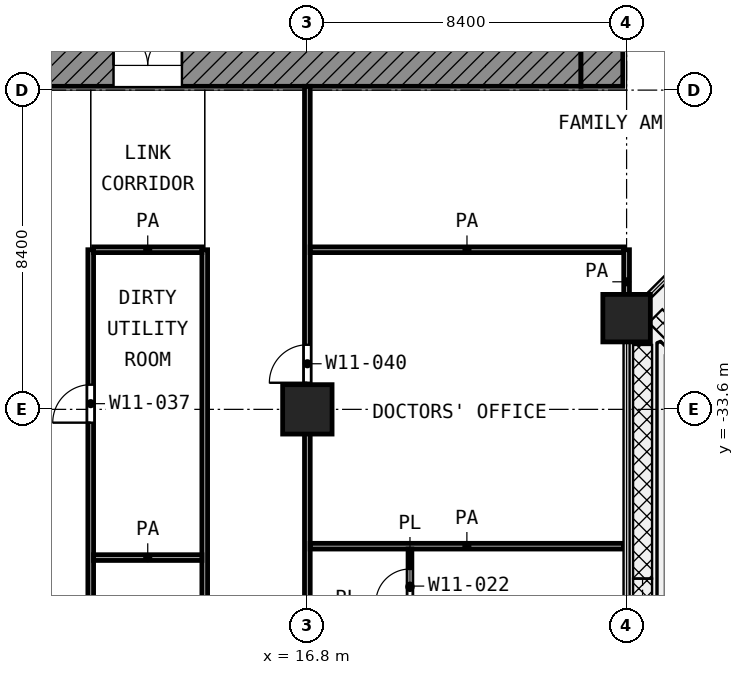
"""IFC4 building model, lengths in metres.
Left out: names, types, materials, properties, quantities, classifications, styles, units other than length and angle.
Written with IfcOpenShell. Run it as: python <this file> out.ifc"""

import sys

from ifc_helpers import new_model, si_unit, direction, frame, frame_2d, origin, origin_2d, place, context, subcontext, project, spatial, rectangle, extrude, element, fill, save


model = new_model("IFC4")
c1 = context("Model", 3, precision=1e-05, world=origin(), true_north=direction((0.0, 1.0)))
c2 = subcontext(c1, "Body", "Model", "MODEL_VIEW")
j1 = project(units=[si_unit("LENGTHUNIT", "METRE"), si_unit("PLANEANGLEUNIT", "RADIAN")], contexts=[c1])
p1 = place(None, origin())
s1 = spatial("IfcSite", under=j1, at=p1, CompositionType="ELEMENT")
p2 = place(p1, origin())
s2 = spatial("IfcBuilding", under=s1, at=p2, CompositionType="ELEMENT")
p3 = place(p2, frame((0.0, 0.0, 72.8)))
s3 = spatial("IfcBuildingStorey", under=s2, at=p3, CompositionType="ELEMENT", Elevation=72.8)
p4 = place(p3, frame((25.2, -31.2, 0.0), z_axis=(0.0, 0.0, 1.0), x_axis=(1.0, 0.0, 0.0)))
e1 = element("IfcColumn", 1, at=p4, inside=s3, PredefinedType="COLUMN", context=c2, shape_type="SweptSolid", body=[
    extrude(rectangle(XDim=1.25, YDim=1.25, at=origin_2d()), origin(), (0.0, 0.0, 1.0), 4.2),
])
p5 = place(p3, frame((16.8, -33.6, 0.0), z_axis=(0.0, 0.0, 1.0), x_axis=(1.0, 0.0, 0.0)))
e2 = element("IfcColumn", 2, at=p5, inside=s3, PredefinedType="COLUMN", context=c2, shape_type="SweptSolid", body=[
    extrude(rectangle(XDim=1.3, YDim=1.3, at=origin_2d()), origin(), (0.0, 0.0, 1.0), 4.2),
])
p6 = place(p3, frame((5.4, -24.55, 0.0), z_axis=(0.0, 0.0, 1.0), x_axis=(1.0, 0.0, 0.0)))
e3 = element("IfcWall", 3, at=p6, inside=s3, PredefinedType="SHEAR", context=c2, shape_type="SweptSolid", body=[
    extrude(rectangle(XDim=18.6, YDim=1.1, at=frame_2d((9.3, 0.0))), origin(), (0.0, 0.0, 1.0), 3.9),
])
p7 = place(p6, frame((6.3, 0.0, 0.0)))
e4 = element("IfcOpeningElement", 4, at=p7, cuts=e3, PredefinedType="OPENING", context=c2, shape_type="SweptSolid", body=[
    extrude(rectangle(XDim=1.8, YDim=2.1, at=frame_2d((0.9, 1.05))), frame((0.0, 0.56, 0.0), z_axis=(0.0, -1.0, 0.0), x_axis=(1.0, 0.0, 0.0)), (0.0, 0.0, 1.0), 1.12),
])
p8 = place(p3, frame((24.55, -25.1, 0.0), z_axis=(0.0, 0.0, 1.0), x_axis=(0.0, 1.0, 0.0)))
e5 = element("IfcWall", 5, at=p8, inside=s3, PredefinedType="SHEAR", context=c2, shape_type="SweptSolid", body=[
    extrude(rectangle(XDim=1.1, YDim=1.1, at=frame_2d((0.55, 0.0))), origin(), (0.0, 0.0, 1.0), 3.9),
])
p9 = place(p3, frame((19.5, -39.3, 0.0), z_axis=(0.0, 0.0, 1.0), x_axis=(0.0, 1.0, 0.0)))
e6 = element("IfcWall", 6, at=p9, inside=s3, PredefinedType="PARTITIONING", context=c2, shape_type="SweptSolid", body=[
    extrude(rectangle(XDim=2.025, YDim=0.1, at=frame_2d((1.013, 0.0))), origin(), (0.0, 0.0, 1.0), 3.9),
])
p10 = place(p9, frame((0.6, 0.0, 0.0)))
e7 = element("IfcOpeningElement", 7, at=p10, cuts=e6, PredefinedType="OPENING", context=c2, shape_type="SweptSolid", body=[
    extrude(rectangle(XDim=0.9, YDim=2.1, at=frame_2d((0.45, 1.05))), frame((0.0, 0.06, 0.0), z_axis=(0.0, -1.0, 0.0), x_axis=(1.0, 0.0, 0.0)), (0.0, 0.0, 1.0), 0.12),
])
p11 = place(p3, frame((11.175, -37.5, 0.0), z_axis=(0.0, 0.0, 1.0), x_axis=(1.0, 0.0, 0.0)))
e8 = element("IfcWall", 8, at=p11, inside=s3, PredefinedType="PARTITIONING", context=c2, shape_type="SweptSolid", body=[
    extrude(rectangle(XDim=2.85, YDim=0.15, at=frame_2d((1.425, 0.0))), origin(), (0.0, 0.0, 1.0), 3.9),
])
p12 = place(p3, frame((16.875, -37.2, 0.0), z_axis=(0.0, 0.0, 1.0), x_axis=(1.0, 0.0, 0.0)))
e9 = element("IfcWall", 9, at=p12, inside=s3, PredefinedType="PARTITIONING", context=c2, shape_type="SweptSolid", body=[
    extrude(rectangle(XDim=8.245, YDim=0.15, at=frame_2d((4.123, 0.0))), origin(), (0.0, 0.0, 1.0), 3.9),
])
p13 = place(p3, frame((11.175, -29.4, 0.0), z_axis=(0.0, 0.0, 1.0), x_axis=(1.0, 0.0, 0.0)))
e10 = element("IfcWall", 10, at=p13, inside=s3, PredefinedType="PARTITIONING", context=c2, shape_type="SweptSolid", body=[
    extrude(rectangle(XDim=2.85, YDim=0.15, at=frame_2d((1.425, 0.0))), origin(), (0.0, 0.0, 1.0), 3.9),
])
p14 = place(p3, frame((16.875, -29.4, 0.0), z_axis=(0.0, 0.0, 1.0), x_axis=(1.0, 0.0, 0.0)))
e11 = element("IfcWall", 11, at=p14, inside=s3, PredefinedType="PARTITIONING", context=c2, shape_type="SweptSolid", body=[
    extrude(rectangle(XDim=8.25, YDim=0.15, at=frame_2d((4.125, 0.0))), origin(), (0.0, 0.0, 1.0), 3.9),
])
p15 = place(p3, frame((11.1, -68.7, 0.0), z_axis=(0.0, 0.0, 1.0), x_axis=(0.0, 1.0, 0.0)))
e12 = element("IfcWall", 12, at=p15, inside=s3, PredefinedType="PARTITIONING", context=c2, shape_type="SweptSolid", body=[
    extrude(rectangle(XDim=39.3, YDim=0.15, at=frame_2d((19.65, 0.0))), origin(), (0.0, 0.0, 1.0), 3.9),
])
p16 = place(p15, frame((34.75, 0.0, 0.0)))
e13 = element("IfcOpeningElement", 13, at=p16, cuts=e12, PredefinedType="OPENING", context=c2, shape_type="SweptSolid", body=[
    extrude(rectangle(XDim=1.0, YDim=2.1, at=frame_2d((0.5, 1.05))), frame((0.0, 0.085, 0.0), z_axis=(0.0, -1.0, 0.0), x_axis=(1.0, 0.0, 0.0)), (0.0, 0.0, 1.0), 0.17),
])
p17 = place(p15, frame((24.25, 0.0, 0.0)))
e14 = element("IfcOpeningElement", 14, at=p17, cuts=e12, PredefinedType="OPENING", context=c2, shape_type="SweptSolid", body=[
    extrude(rectangle(XDim=1.0, YDim=2.1, at=frame_2d((0.5, 1.05))), frame((0.0, 0.085, 0.0), z_axis=(0.0, -1.0, 0.0), x_axis=(1.0, 0.0, 0.0)), (0.0, 0.0, 1.0), 0.17),
])
p18 = place(p15, frame((16.0, 0.0, 0.0)))
e15 = element("IfcOpeningElement", 15, at=p18, cuts=e12, PredefinedType="OPENING", context=c2, shape_type="SweptSolid", body=[
    extrude(rectangle(XDim=1.0, YDim=2.1, at=frame_2d((0.5, 1.05))), frame((0.0, 0.085, 0.0), z_axis=(0.0, -1.0, 0.0), x_axis=(1.0, 0.0, 0.0)), (0.0, 0.0, 1.0), 0.17),
])
p19 = place(p15, frame((11.85, 0.0, 0.0)))
e16 = element("IfcOpeningElement", 16, at=p19, cuts=e12, PredefinedType="OPENING", context=c2, shape_type="SweptSolid", body=[
    extrude(rectangle(XDim=0.9, YDim=2.1, at=frame_2d((0.45, 1.05))), frame((0.0, 0.085, 0.0), z_axis=(0.0, -1.0, 0.0), x_axis=(1.0, 0.0, 0.0)), (0.0, 0.0, 1.0), 0.17),
])
p20 = place(p3, frame((14.1, -68.7, 0.0), z_axis=(0.0, 0.0, 1.0), x_axis=(0.0, 1.0, 0.0)))
e17 = element("IfcWall", 17, at=p20, inside=s3, PredefinedType="PARTITIONING", context=c2, shape_type="SweptSolid", body=[
    extrude(rectangle(XDim=39.3, YDim=0.15, at=frame_2d((19.65, 0.0))), origin(), (0.0, 0.0, 1.0), 3.9),
])
p21 = place(p20, frame((4.35, 0.0, 0.0)))
e18 = element("IfcOpeningElement", 18, at=p21, cuts=e17, PredefinedType="OPENING", context=c2, shape_type="SweptSolid", body=[
    extrude(rectangle(XDim=1.2, YDim=2.1, at=frame_2d((0.6, 1.05))), frame((0.0, 0.085, 0.0), z_axis=(0.0, -1.0, 0.0), x_axis=(1.0, 0.0, 0.0)), (0.0, 0.0, 1.0), 0.17),
])
p22 = place(p3, frame((16.8, -71.32, 0.0), z_axis=(0.0, 0.0, 1.0), x_axis=(0.0, 1.0, 0.0)))
e19 = element("IfcWall", 19, at=p22, inside=s3, PredefinedType="PARTITIONING", context=c2, shape_type="SweptSolid", body=[
    extrude(rectangle(XDim=46.22, YDim=0.15, at=frame_2d((23.11, 0.0))), origin(), (0.0, 0.0, 1.0), 3.9),
])
p23 = place(p22, frame((38.42, 0.0, 0.0)))
e20 = element("IfcOpeningElement", 20, at=p23, cuts=e19, PredefinedType="OPENING", context=c2, shape_type="SweptSolid", body=[
    extrude(rectangle(XDim=1.0, YDim=2.1, at=frame_2d((0.5, 1.05))), frame((0.0, 0.085, 0.0), z_axis=(0.0, -1.0, 0.0), x_axis=(1.0, 0.0, 0.0)), (0.0, 0.0, 1.0), 0.17),
])
p24 = place(p22, frame((30.22, 0.0, 0.0)))
e21 = element("IfcOpeningElement", 21, at=p24, cuts=e19, PredefinedType="OPENING", context=c2, shape_type="SweptSolid", body=[
    extrude(rectangle(XDim=1.2, YDim=2.1, at=frame_2d((0.6, 1.05))), frame((0.0, 0.085, 0.0), z_axis=(0.0, -1.0, 0.0), x_axis=(1.0, 0.0, 0.0)), (0.0, 0.0, 1.0), 0.17),
])
p25 = place(p22, frame((27.42, 0.0, 0.0)))
e22 = element("IfcOpeningElement", 22, at=p25, cuts=e19, PredefinedType="OPENING", context=c2, shape_type="SweptSolid", body=[
    extrude(rectangle(XDim=1.2, YDim=2.1, at=frame_2d((0.6, 1.05))), frame((0.0, 0.085, 0.0), z_axis=(0.0, -1.0, 0.0), x_axis=(1.0, 0.0, 0.0)), (0.0, 0.0, 1.0), 0.17),
])
p26 = place(p22, frame((25.57, 0.0, 0.0)))
e23 = element("IfcOpeningElement", 23, at=p26, cuts=e19, PredefinedType="OPENING", context=c2, shape_type="SweptSolid", body=[
    extrude(rectangle(XDim=1.2, YDim=2.1, at=frame_2d((0.6, 1.05))), frame((0.0, 0.085, 0.0), z_axis=(0.0, -1.0, 0.0), x_axis=(1.0, 0.0, 0.0)), (0.0, 0.0, 1.0), 0.17),
])
p27 = place(p22, frame((21.62, 0.0, 0.0)))
e24 = element("IfcOpeningElement", 24, at=p27, cuts=e19, PredefinedType="OPENING", context=c2, shape_type="SweptSolid", body=[
    extrude(rectangle(XDim=1.2, YDim=2.1, at=frame_2d((0.6, 1.05))), frame((0.0, 0.085, 0.0), z_axis=(0.0, -1.0, 0.0), x_axis=(1.0, 0.0, 0.0)), (0.0, 0.0, 1.0), 0.17),
])
p28 = place(p22, frame((14.32, 0.0, 0.0)))
e25 = element("IfcOpeningElement", 25, at=p28, cuts=e19, PredefinedType="OPENING", context=c2, shape_type="SweptSolid", body=[
    extrude(rectangle(XDim=1.2, YDim=2.1, at=frame_2d((0.6, 1.05))), frame((0.0, 0.085, 0.0), z_axis=(0.0, -1.0, 0.0), x_axis=(1.0, 0.0, 0.0)), (0.0, 0.0, 1.0), 0.17),
])
p29 = place(p22, frame((18.52, 0.0, 0.0)))
e26 = element("IfcOpeningElement", 26, at=p29, cuts=e19, PredefinedType="OPENING", context=c2, shape_type="SweptSolid", body=[
    extrude(rectangle(XDim=1.2, YDim=2.1, at=frame_2d((0.6, 1.05))), frame((0.0, 0.085, 0.0), z_axis=(0.0, -1.0, 0.0), x_axis=(1.0, 0.0, 0.0)), (0.0, 0.0, 1.0), 0.17),
])
p30 = place(p22, frame((10.92, 0.0, 0.0)))
e27 = element("IfcOpeningElement", 27, at=p30, cuts=e19, PredefinedType="OPENING", context=c2, shape_type="SweptSolid", body=[
    extrude(rectangle(XDim=0.9, YDim=2.1, at=frame_2d((0.45, 1.05))), frame((0.0, 0.085, 0.0), z_axis=(0.0, -1.0, 0.0), x_axis=(1.0, 0.0, 0.0)), (0.0, 0.0, 1.0), 0.17),
])
p31 = place(p22, frame((4.82, 0.0, 0.0)))
e28 = element("IfcOpeningElement", 28, at=p31, cuts=e19, PredefinedType="OPENING", context=c2, shape_type="SweptSolid", body=[
    extrude(rectangle(XDim=1.5, YDim=2.1, at=frame_2d((0.75, 1.05))), frame((0.0, 0.085, 0.0), z_axis=(0.0, -1.0, 0.0), x_axis=(1.0, 0.0, 0.0)), (0.0, 0.0, 1.0), 0.17),
])
p32 = place(p3, frame((25.2, -31.087, 0.0), z_axis=(0.0, 0.0, 1.0), x_axis=(0.0, 1.0, 0.0)))
e29 = element("IfcWall", 29, at=p32, inside=s3, PredefinedType="PARTITIONING", context=c2, shape_type="SweptSolid", body=[
    extrude(rectangle(XDim=1.687, YDim=0.15, at=frame_2d((0.844, 0.0))), origin(), (0.0, 0.0, 1.0), 3.9),
])
p33 = place(p7, origin())
e30 = element("IfcDoor", 30, at=p33, inside=s3, OperationType="DOUBLE_DOOR_SINGLE_SWING", PredefinedType="DOOR", context=c2, shape_type="SweptSolid", body=[
    extrude(rectangle(XDim=1.8, YDim=2.1, at=frame_2d((0.9, 1.05))), frame((0.0, 0.025, 0.0), z_axis=(0.0, -1.0, 0.0), x_axis=(1.0, 0.0, 0.0)), (0.0, 0.0, 1.0), 0.05),
])
fill(e4, e30)
p34 = place(p16, origin())
e31 = element("IfcDoor", 31, at=p34, inside=s3, OperationType="SINGLE_SWING_LEFT", PredefinedType="DOOR", context=c2, shape_type="SweptSolid", body=[
    extrude(rectangle(XDim=1.0, YDim=2.1, at=frame_2d((0.5, 1.05))), frame((0.0, 0.025, 0.0), z_axis=(0.0, -1.0, 0.0), x_axis=(1.0, 0.0, 0.0)), (0.0, 0.0, 1.0), 0.05),
])
fill(e13, e31)
p35 = place(p23, origin())
e32 = element("IfcDoor", 32, at=p35, inside=s3, OperationType="SINGLE_SWING_LEFT", PredefinedType="DOOR", context=c2, shape_type="SweptSolid", body=[
    extrude(rectangle(XDim=1.0, YDim=2.1, at=frame_2d((0.5, 1.05))), frame((0.0, 0.025, 0.0), z_axis=(0.0, -1.0, 0.0), x_axis=(1.0, 0.0, 0.0)), (0.0, 0.0, 1.0), 0.05),
])
fill(e20, e32)
p36 = place(p10, origin())
e33 = element("IfcDoor", 33, at=p36, inside=s3, OperationType="SINGLE_SWING_LEFT", PredefinedType="DOOR", context=c2, shape_type="SweptSolid", body=[
    extrude(rectangle(XDim=0.9, YDim=2.1, at=frame_2d((0.45, 1.05))), frame((0.0, 0.025, 0.0), z_axis=(0.0, -1.0, 0.0), x_axis=(1.0, 0.0, 0.0)), (0.0, 0.0, 1.0), 0.05),
])
fill(e7, e33)
save(model, sys.argv[1])
